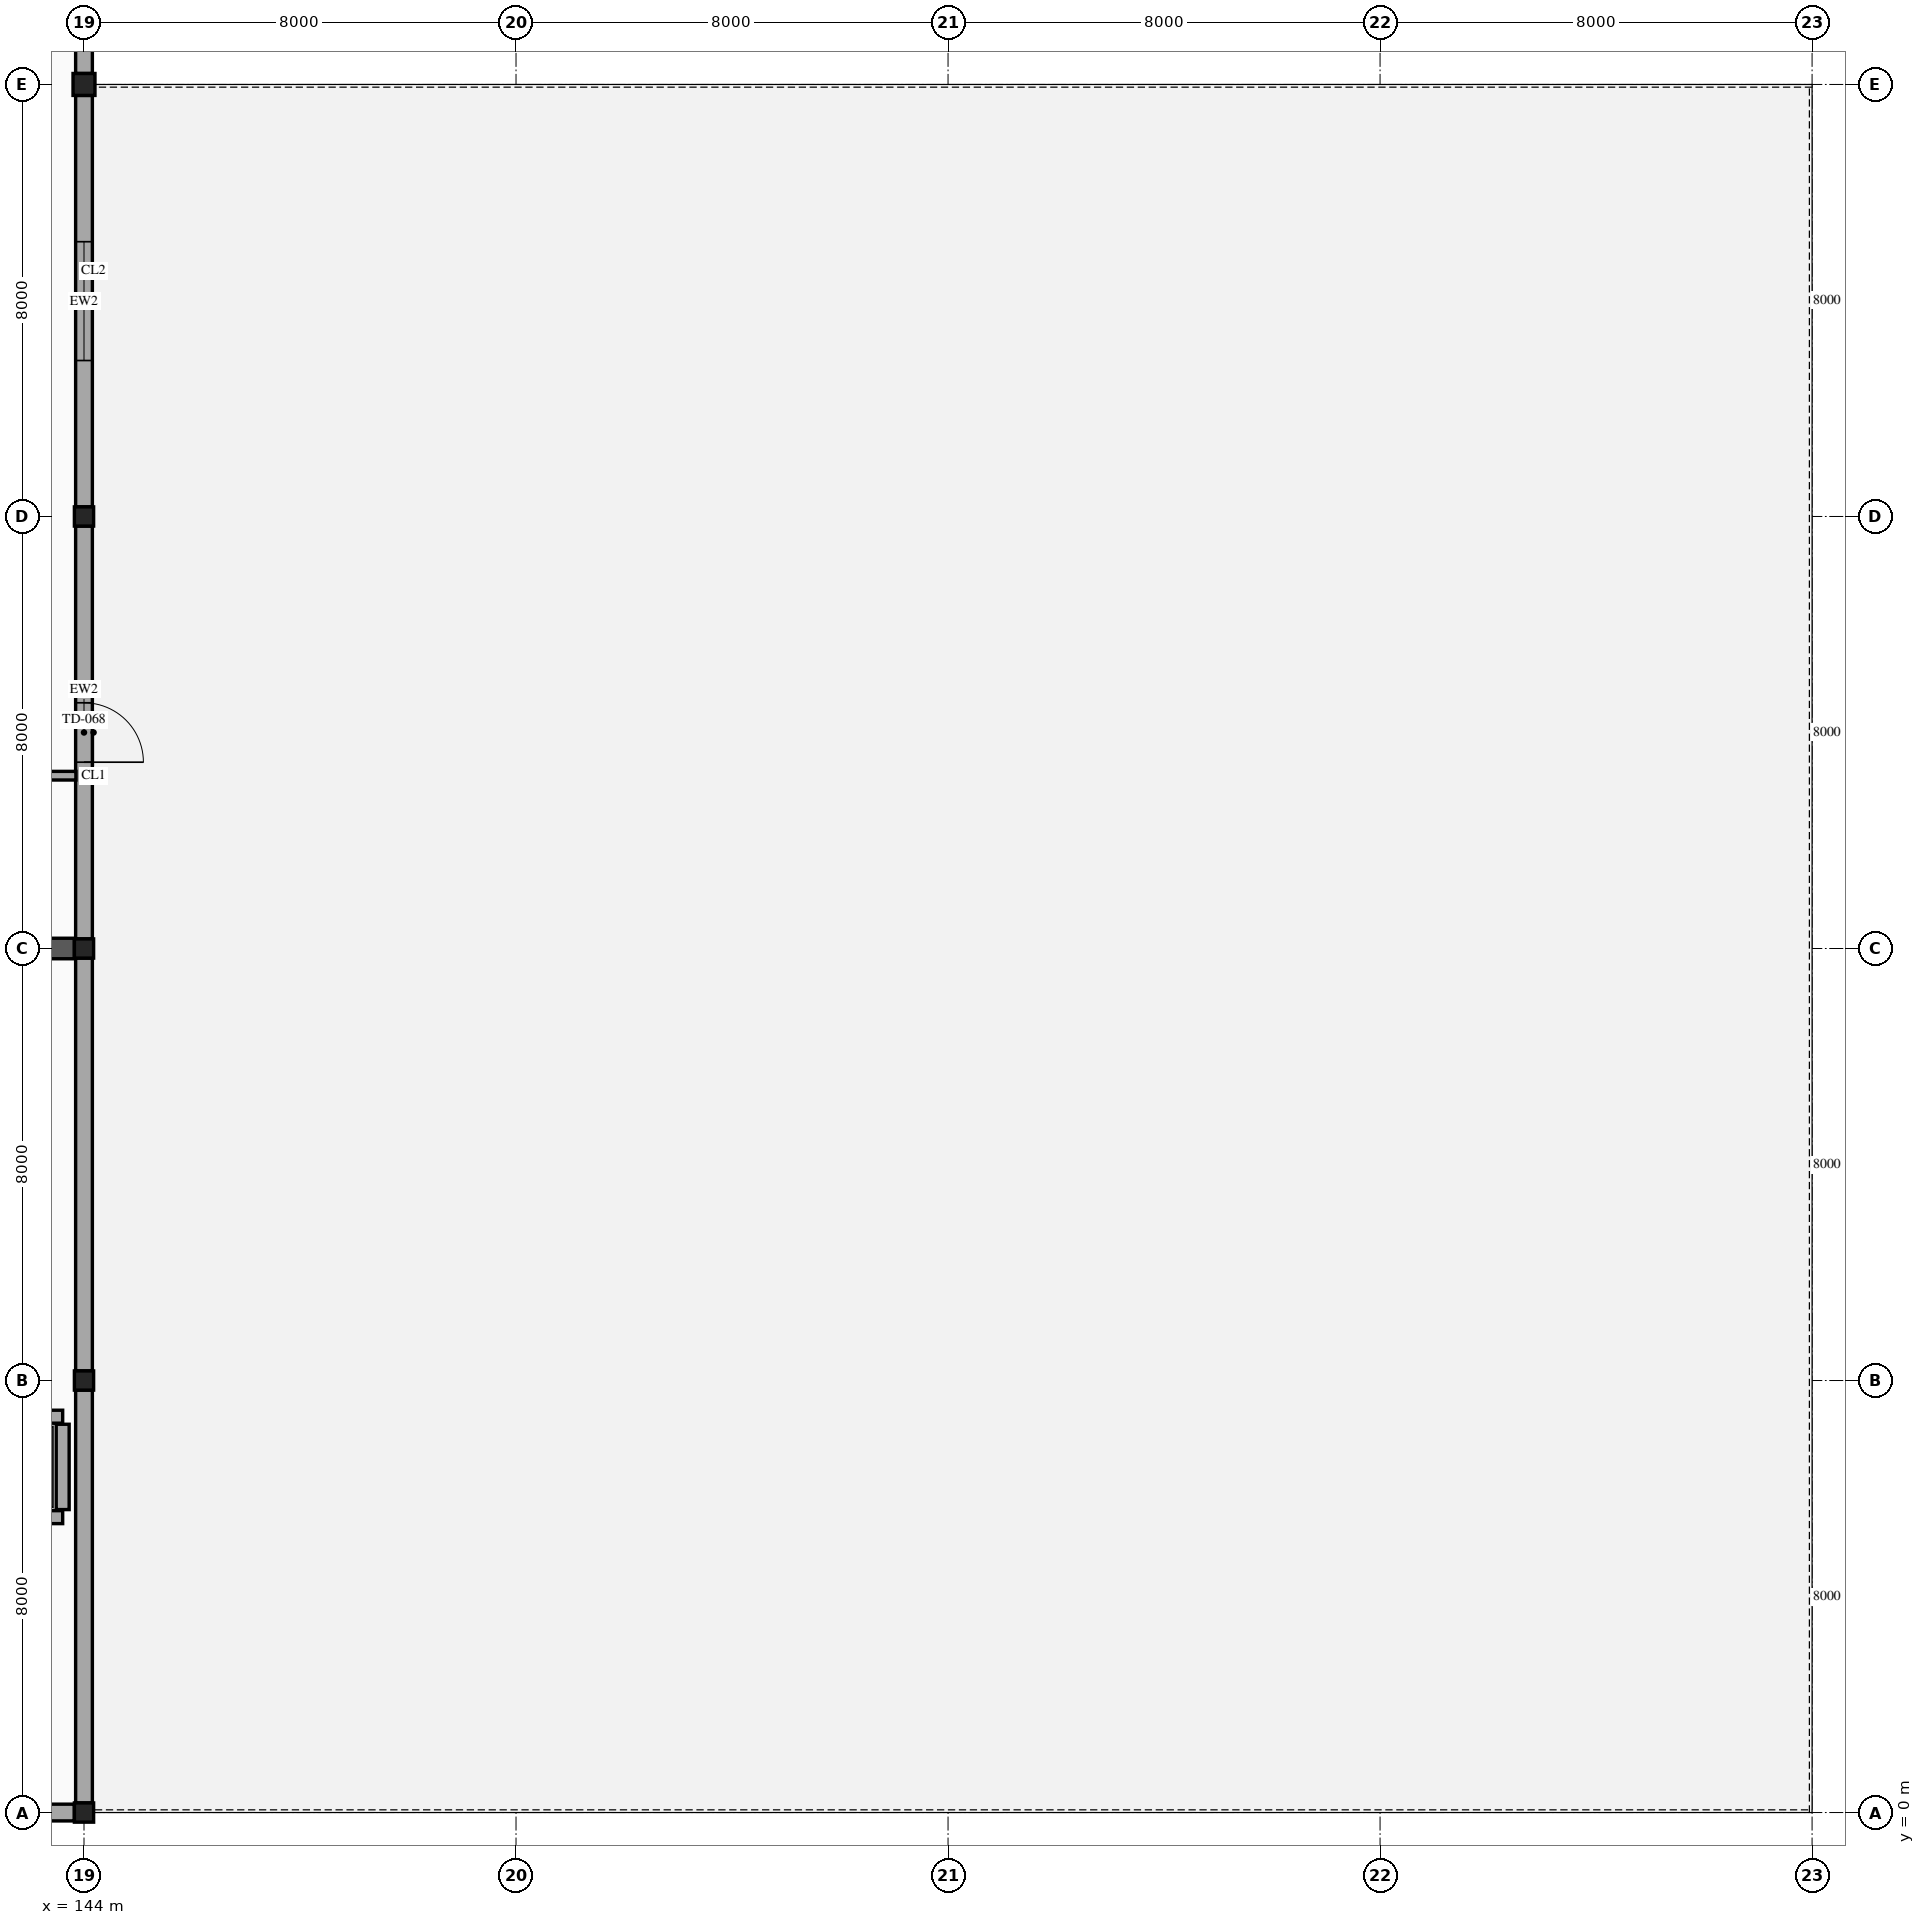
"""IFC4 building model, lengths in metres.
Left out: names, types, materials, properties, quantities, classifications, styles, units other than length and angle.
Written with IfcOpenShell. Run it as: python <this file> out.ifc"""

import sys

from ifc_helpers import new_model, si_unit, direction, frame, frame_2d, origin, origin_2d, place, context, subcontext, project, spatial, rectangle, hollow_rectangle, hollow_circle, extrude, element, fill, save


model = new_model("IFC4")
c1 = context("Model", 3, precision=1e-05, world=origin(), true_north=direction((0.0, 1.0)))
c2 = subcontext(c1, "Body", "Model", "MODEL_VIEW")
j1 = project(units=[si_unit("LENGTHUNIT", "METRE"), si_unit("PLANEANGLEUNIT", "RADIAN")], contexts=[c1])
p1 = place(None, origin())
s1 = spatial("IfcSite", under=j1, at=p1, CompositionType="ELEMENT")
p2 = place(p1, origin())
s2 = spatial("IfcBuilding", under=s1, at=p2, CompositionType="ELEMENT")
p3 = place(p2, frame((0.0, 0.0, 14.9)))
s3 = spatial("IfcBuildingStorey", under=s2, at=p3, CompositionType="ELEMENT", Elevation=14.9)
for number, where, z_axis, x_axis in (
    (1, (144.0, 0.0, 0.0), (0.0, 0.0, 1.0), (1.0, 0.0, 0.0)),
    (2, (144.0, 8.0, 0.0), (0.0, 0.0, 1.0), (1.0, 0.0, 0.0)),
    (3, (144.0, 16.0, 0.0), (0.0, 0.0, 1.0), (1.0, 0.0, 0.0)),
    (4, (144.0, 24.0, 0.0), (0.0, 0.0, 1.0), (1.0, 0.0, 0.0)),
):
    element("IfcColumn", number, at=place(p3, frame(where, z_axis=z_axis, x_axis=x_axis)), inside=s3, PredefinedType="COLUMN", context=c2, shape_type="SweptSolid", body=[
        extrude(hollow_rectangle(XDim=0.356, YDim=0.356, WallThickness=0.012, InnerFilletRadius=0.012, OuterFilletRadius=0.024, at=origin_2d()), origin(), (0.0, 0.0, 1.0), 4.5),
    ])
p4 = place(p3, frame((144.0, 32.0, 0.0), z_axis=(0.0, 0.0, 1.0), x_axis=(1.0, 0.0, 0.0)))
e5 = element("IfcColumn", 5, at=p4, inside=s3, PredefinedType="COLUMN", context=c2, shape_type="SweptSolid", body=[
    extrude(hollow_circle(Radius=0.203, WallThickness=0.012, at=origin_2d()), origin(), (0.0, 0.0, 1.0), 4.5),
])
p5 = place(p3, frame((144.0, 33.6, 0.0), z_axis=(0.0, 0.0, 1.0), x_axis=(0.0, -1.0, 0.0)))
e6 = element("IfcWall", 6, at=p5, inside=s3, PredefinedType="STANDARD", context=c2, shape_type="SweptSolid", body=[
    extrude(rectangle(XDim=1.397, YDim=0.31, at=frame_2d((0.699, 0.0))), origin(), (0.0, 0.0, 1.0), 3.48),
])
p6 = place(p3, frame((144.0, 31.797, 0.0), z_axis=(0.0, 0.0, 1.0), x_axis=(0.0, -1.0, 0.0)))
e7 = element("IfcWall", 7, at=p6, inside=s3, PredefinedType="STANDARD", context=c2, shape_type="SweptSolid", body=[
    extrude(rectangle(XDim=7.619, YDim=0.31, at=frame_2d((3.81, 0.0))), origin(), (0.0, 0.0, 1.0), 3.48),
])
p7 = place(p6, frame((2.709, 0.0, 0.8)))
e8 = element("IfcOpeningElement", 8, at=p7, cuts=e7, PredefinedType="OPENING", context=c2, shape_type="SweptSolid", body=[
    extrude(rectangle(XDim=2.2, YDim=2.05, at=frame_2d((1.1, 1.025))), frame((0.0, 0.165, 0.0), z_axis=(0.0, -1.0, 0.0), x_axis=(1.0, 0.0, 0.0)), (0.0, 0.0, 1.0), 0.33),
])
p8 = place(p3, frame((144.0, 23.822, 0.0), z_axis=(0.0, 0.0, 1.0), x_axis=(0.0, -1.0, 0.0)))
e9 = element("IfcWall", 9, at=p8, inside=s3, PredefinedType="STANDARD", context=c2, shape_type="SweptSolid", body=[
    extrude(rectangle(XDim=7.644, YDim=0.31, at=frame_2d((3.822, 0.0))), origin(), (0.0, 0.0, 1.0), 3.48),
])
p9 = place(p8, frame((3.272, 0.0, 0.0)))
e10 = element("IfcOpeningElement", 10, at=p9, cuts=e9, PredefinedType="OPENING", context=c2, shape_type="SweptSolid", body=[
    extrude(rectangle(XDim=1.1, YDim=2.15, at=frame_2d((0.55, 1.075))), frame((0.0, 0.165, 0.0), z_axis=(0.0, -1.0, 0.0), x_axis=(1.0, 0.0, 0.0)), (0.0, 0.0, 1.0), 0.33),
])
for number, where, z_axis, x_axis in (
    (11, (144.0, 15.822, 0.0), (0.0, 0.0, 1.0), (0.0, -1.0, 0.0)),
    (12, (144.0, 7.822, 0.0), (0.0, 0.0, 1.0), (0.0, -1.0, 0.0)),
):
    element("IfcWall", number, at=place(p3, frame(where, z_axis=z_axis, x_axis=x_axis)), inside=s3, PredefinedType="STANDARD", context=c2, shape_type="SweptSolid", body=[
        extrude(rectangle(XDim=7.644, YDim=0.31, at=frame_2d((3.822, 0.0))), origin(), (0.0, 0.0, 1.0), 3.48),
    ])
p10 = place(p3, frame((143.822, 0.0, 0.0), z_axis=(0.0, 0.0, 1.0), x_axis=(-1.0, 0.0, 0.0)))
e13 = element("IfcWall", 13, at=p10, inside=s3, PredefinedType="STANDARD", context=c2, shape_type="SweptSolid", body=[
    extrude(rectangle(XDim=7.619, YDim=0.31, at=frame_2d((3.81, 0.0))), origin(), (0.0, 0.0, 1.0), 3.48),
])
p11 = place(p3, frame((136.375, 16.0, 0.0), z_axis=(0.0, 0.0, 1.0), x_axis=(1.0, 0.0, 0.0)))
e14 = element("IfcWall", 14, at=p11, inside=s3, PredefinedType="SHEAR", context=c2, shape_type="SweptSolid", body=[
    extrude(rectangle(XDim=7.447, YDim=0.38, at=frame_2d((3.724, 0.0))), origin(), (0.0, 0.0, 1.0), 4.28),
])
p12 = place(p11, frame((2.974, 0.0, 0.0)))
e15 = element("IfcOpeningElement", 15, at=p12, cuts=e14, PredefinedType="OPENING", context=c2, shape_type="SweptSolid", body=[
    extrude(rectangle(XDim=1.5, YDim=2.15, at=frame_2d((0.75, 1.075))), frame((0.0, 0.2, 0.0), z_axis=(0.0, -1.0, 0.0), x_axis=(1.0, 0.0, 0.0)), (0.0, 0.0, 1.0), 0.4),
])
p13 = place(p3, frame((141.295, 7.33, 0.0), z_axis=(0.0, 0.0, 1.0), x_axis=(1.0, 0.0, 0.0)))
e16 = element("IfcWall", 16, at=p13, inside=s3, PredefinedType="PARTITIONING", context=c2, shape_type="SweptSolid", body=[
    extrude(rectangle(XDim=2.31, YDim=0.24, at=frame_2d((1.155, 0.0))), origin(), (0.0, 0.0, 1.0), 4.28),
])
p14 = place(p13, frame((0.605, 0.0, 0.0)))
e17 = element("IfcOpeningElement", 17, at=p14, cuts=e16, PredefinedType="OPENING", context=c2, shape_type="SweptSolid", body=[
    extrude(rectangle(XDim=1.1, YDim=2.15, at=frame_2d((0.55, 1.075))), frame((0.0, 0.13, 0.0), z_axis=(0.0, -1.0, 0.0), x_axis=(1.0, 0.0, 0.0)), (0.0, 0.0, 1.0), 0.26),
])
p15 = place(p3, frame((141.295, 5.47, 0.0), z_axis=(0.0, 0.0, 1.0), x_axis=(1.0, 0.0, 0.0)))
e18 = element("IfcWall", 18, at=p15, inside=s3, PredefinedType="PARTITIONING", context=c2, shape_type="SweptSolid", body=[
    extrude(rectangle(XDim=2.31, YDim=0.24, at=frame_2d((1.155, 0.0))), origin(), (0.0, 0.0, 1.0), 4.28),
])
p16 = place(p3, frame((143.605, 5.61, 0.0), z_axis=(0.0, 0.0, 1.0), x_axis=(0.0, 1.0, 0.0)))
e19 = element("IfcWall", 19, at=p16, inside=s3, PredefinedType="PARTITIONING", context=c2, shape_type="SweptSolid", body=[
    extrude(rectangle(XDim=1.58, YDim=0.24, at=frame_2d((0.79, 0.0))), origin(), (0.0, 0.0, 1.0), 4.28),
])
p17 = place(p3, frame((124.4, 19.2, 0.0), z_axis=(0.0, 0.0, 1.0), x_axis=(1.0, 0.0, 0.0)))
e20 = element("IfcWall", 20, at=p17, inside=s3, PredefinedType="PARTITIONING", context=c2, shape_type="SweptSolid", body=[
    extrude(rectangle(XDim=19.45, YDim=0.16, at=frame_2d((9.725, 0.0))), origin(), (0.0, 0.0, 1.0), 3.48),
])
p18 = place(p17, frame((14.92, 0.0, 0.0)))
e21 = element("IfcOpeningElement", 21, at=p18, cuts=e20, PredefinedType="OPENING", context=c2, shape_type="SweptSolid", body=[
    extrude(rectangle(XDim=1.7, YDim=2.25, at=frame_2d((0.85, 1.125))), frame((0.0, 0.09, 0.0), z_axis=(0.0, -1.0, 0.0), x_axis=(1.0, 0.0, 0.0)), (0.0, 0.0, 1.0), 0.18),
])
p19 = place(p7, origin())
e22 = element("IfcWindow", 22, at=p19, inside=s3, PartitioningType="DOUBLE_PANEL_VERTICAL", PredefinedType="WINDOW", context=c2, shape_type="SweptSolid", body=[
    extrude(rectangle(XDim=2.2, YDim=2.05, at=frame_2d((1.1, 1.025))), frame((0.0, 0.03, 0.0), z_axis=(0.0, -1.0, 0.0), x_axis=(1.0, 0.0, 0.0)), (0.0, 0.0, 1.0), 0.06),
])
fill(e8, e22)
p20 = place(p9, origin())
e23 = element("IfcDoor", 23, at=p20, inside=s3, OperationType="SINGLE_SWING_RIGHT", PredefinedType="DOOR", context=c2, shape_type="SweptSolid", body=[
    extrude(rectangle(XDim=1.1, YDim=2.15, at=frame_2d((0.55, 1.075))), frame((0.0, 0.025, 0.0), z_axis=(0.0, -1.0, 0.0), x_axis=(1.0, 0.0, 0.0)), (0.0, 0.0, 1.0), 0.05),
])
fill(e10, e23)
save(model, sys.argv[1])
